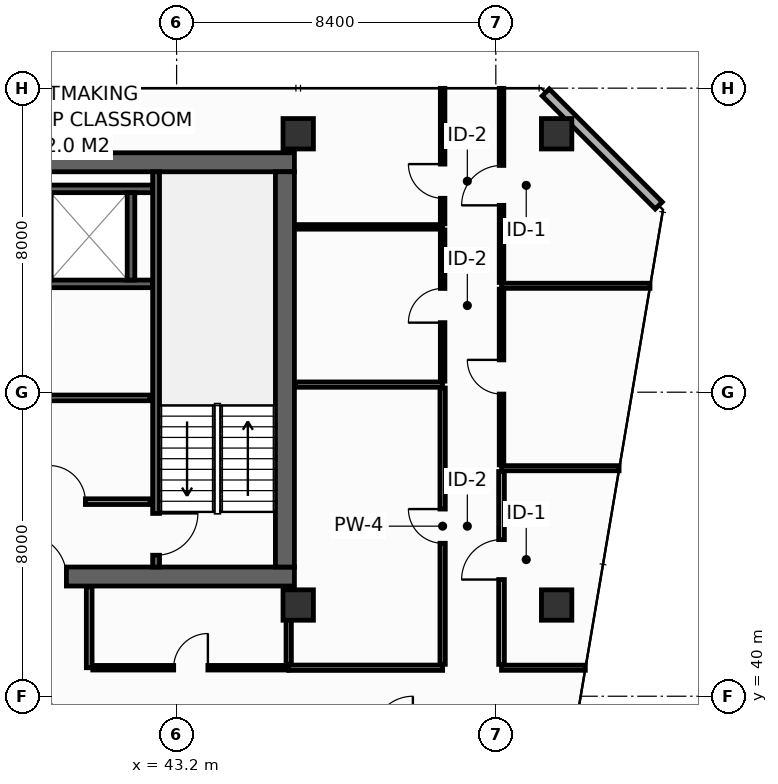
"""IFC4 building model, lengths in metres.
Left out: names, types, materials, properties, quantities, classifications, styles, units other than length and angle.
Written with IfcOpenShell. Run it as: python <this file> out.ifc"""

import sys

from ifc_helpers import new_model, si_unit, direction, frame, frame_2d, origin, origin_2d, place, context, subcontext, project, spatial, rectangle, hollow_rectangle, extrude, element, fill, save


model = new_model("IFC4")
c1 = context("Model", 3, precision=1e-05, world=origin(), true_north=direction((0.0, 1.0)))
c2 = subcontext(c1, "Body", "Model", "MODEL_VIEW")
j1 = project(units=[si_unit("LENGTHUNIT", "METRE"), si_unit("PLANEANGLEUNIT", "RADIAN")], contexts=[c1])
p1 = place(None, origin())
s1 = spatial("IfcSite", under=j1, at=p1, CompositionType="ELEMENT")
p2 = place(p1, origin())
s2 = spatial("IfcBuilding", under=s1, at=p2, CompositionType="ELEMENT")
p3 = place(p2, frame((0.0, 0.0, 217.0)))
s3 = spatial("IfcBuildingStorey", under=s2, at=p3, CompositionType="ELEMENT", Elevation=217.0)
p4 = place(p3, frame((13.6, 43.15, 0.0), z_axis=(0.0, 0.0, 1.0), x_axis=(1.0, 0.0, 0.0)))
e1 = element("IfcWall", 1, at=p4, inside=s3, PredefinedType="SHEAR", context=c2, shape_type="SweptSolid", body=[
    extrude(rectangle(XDim=32.7, YDim=0.5, at=frame_2d((16.35, 0.0))), origin(), (0.0, 0.0, 1.0), 3.55),
])
p5 = place(p4, frame((5.4, 0.0, 0.0)))
e2 = element("IfcOpeningElement", 2, at=p5, cuts=e1, PredefinedType="OPENING", context=c2, shape_type="SweptSolid", body=[
    extrude(rectangle(XDim=1.1, YDim=2.15, at=frame_2d((0.55, 1.075))), frame((0.0, 0.26, 0.0), z_axis=(0.0, -1.0, 0.0), x_axis=(1.0, 0.0, 0.0)), (0.0, 0.0, 1.0), 0.52),
])
p6 = place(p4, frame((25.6, 0.0, 0.0)))
e3 = element("IfcOpeningElement", 3, at=p6, cuts=e1, PredefinedType="OPENING", context=c2, shape_type="SweptSolid", body=[
    extrude(rectangle(XDim=1.1, YDim=2.15, at=frame_2d((0.55, 1.075))), frame((0.0, 0.26, 0.0), z_axis=(0.0, -1.0, 0.0), x_axis=(1.0, 0.0, 0.0)), (0.0, 0.0, 1.0), 0.52),
])
p7 = place(p3, frame((13.6, 54.05, 0.0), z_axis=(0.0, 0.0, 1.0), x_axis=(1.0, 0.0, 0.0)))
e4 = element("IfcWall", 4, at=p7, inside=s3, PredefinedType="SHEAR", context=c2, shape_type="SweptSolid", body=[
    extrude(rectangle(XDim=32.7, YDim=0.5, at=frame_2d((16.35, 0.0))), origin(), (0.0, 0.0, 1.0), 3.55),
])
p8 = place(p3, frame((46.05, 43.4, 0.0), z_axis=(0.0, 0.0, 1.0), x_axis=(0.0, 1.0, 0.0)))
e5 = element("IfcWall", 5, at=p8, inside=s3, PredefinedType="SHEAR", context=c2, shape_type="SweptSolid", body=[
    extrude(rectangle(XDim=10.4, YDim=0.5, at=frame_2d((5.2, 0.0))), origin(), (0.0, 0.0, 1.0), 3.55),
])
for number, where, z_axis, x_axis in (
    (6, (46.4, 54.8, 0.0), (0.0, 0.0, 1.0), (1.0, 0.0, 0.0)),
    (7, (53.2, 54.8, 0.0), (0.0, 0.0, 1.0), (1.0, 0.0, 0.0)),
    (8, (46.4, 42.4, 0.0), (0.0, 0.0, 1.0), (1.0, 0.0, 0.0)),
    (9, (53.2, 42.4, 0.0), (0.0, 0.0, 1.0), (1.0, 0.0, 0.0)),
):
    element("IfcColumn", number, at=place(p3, frame(where, z_axis=z_axis, x_axis=x_axis)), inside=s3, PredefinedType="COLUMN", context=c2, shape_type="SweptSolid", body=[
        extrude(hollow_rectangle(XDim=0.8, YDim=0.8, WallThickness=0.036, at=origin_2d()), origin(), (0.0, 0.0, 1.0), 3.8),
    ])
for number, where, z_axis, x_axis in (
    (10, (39.525, 50.85, 0.0), (0.0, 0.0, 1.0), (1.0, 0.0, 0.0)),
    (11, (39.525, 53.35, 0.0), (0.0, 0.0, 1.0), (1.0, 0.0, 0.0)),
):
    element("IfcWall", number, at=place(p3, frame(where, z_axis=z_axis, x_axis=x_axis)), inside=s3, PredefinedType="SHEAR", context=c2, shape_type="SweptSolid", body=[
        extrude(rectangle(XDim=3.045, YDim=0.2, at=frame_2d((1.522, 0.0))), origin(), (0.0, 0.0, 1.0), 3.55),
    ])
p9 = place(p3, frame((42.0, 50.95, 0.0), z_axis=(0.0, 0.0, 1.0), x_axis=(0.0, 1.0, 0.0)))
e12 = element("IfcWall", 12, at=p9, inside=s3, PredefinedType="SHEAR", context=c2, shape_type="SweptSolid", body=[
    extrude(rectangle(XDim=2.3, YDim=0.2, at=frame_2d((1.15, 0.0))), origin(), (0.0, 0.0, 1.0), 3.55),
])
p10 = place(p3, frame((42.66, 53.8, 0.0), z_axis=(0.0, 0.0, 1.0), x_axis=(0.0, -1.0, 0.0)))
e13 = element("IfcWall", 13, at=p10, inside=s3, PredefinedType="SHEAR", context=c2, shape_type="SweptSolid", body=[
    extrude(rectangle(XDim=10.4, YDim=0.18, at=frame_2d((5.2, 0.0))), origin(), (0.0, 0.0, 1.0), 3.55),
])
p11 = place(p10, frame((8.99, 0.0, 0.0)))
e14 = element("IfcOpeningElement", 14, at=p11, cuts=e13, PredefinedType="OPENING", context=c2, shape_type="SweptSolid", body=[
    extrude(rectangle(XDim=1.1, YDim=2.15, at=frame_2d((0.55, 1.075))), frame((0.0, 0.1, 0.0), z_axis=(0.0, -1.0, 0.0), x_axis=(1.0, 0.0, 0.0)), (0.0, 0.0, 1.0), 0.2),
])
p12 = place(p3, frame((34.05, 45.12, 0.0), z_axis=(0.0, 0.0, 1.0), x_axis=(1.0, 0.0, 0.0)))
e15 = element("IfcWall", 15, at=p12, inside=s3, PredefinedType="PARTITIONING", context=c2, shape_type="SweptSolid", body=[
    extrude(rectangle(XDim=8.45, YDim=0.15, at=frame_2d((4.225, 0.0))), origin(), (0.0, 0.0, 1.0), 3.55),
])
p13 = place(p12, frame((1.5, 0.0, 0.0)))
e16 = element("IfcOpeningElement", 16, at=p13, cuts=e15, PredefinedType="OPENING", context=c2, shape_type="SweptSolid", body=[
    extrude(rectangle(XDim=0.95, YDim=2.15, at=frame_2d((0.475, 1.075))), frame((0.0, 0.085, 0.0), z_axis=(0.0, -1.0, 0.0), x_axis=(1.0, 0.0, 0.0)), (0.0, 0.0, 1.0), 0.17),
])
p14 = place(p12, frame((5.8, 0.0, 0.0)))
e17 = element("IfcOpeningElement", 17, at=p14, cuts=e15, PredefinedType="OPENING", context=c2, shape_type="SweptSolid", body=[
    extrude(rectangle(XDim=0.95, YDim=2.15, at=frame_2d((0.475, 1.075))), frame((0.0, 0.085, 0.0), z_axis=(0.0, -1.0, 0.0), x_axis=(1.0, 0.0, 0.0)), (0.0, 0.0, 1.0), 0.17),
])
p15 = place(p3, frame((34.05, 47.85, 0.0), z_axis=(0.0, 0.0, 1.0), x_axis=(1.0, 0.0, 0.0)))
e18 = element("IfcWall", 18, at=p15, inside=s3, PredefinedType="PARTITIONING", context=c2, shape_type="SweptSolid", body=[
    extrude(rectangle(XDim=8.45, YDim=0.15, at=frame_2d((4.225, 0.0))), origin(), (0.0, 0.0, 1.0), 3.55),
])
p16 = place(p3, frame((55.887, 52.913, 0.0), z_axis=(0.0, 0.0, 1.0), x_axis=(-0.707106781187, 0.707106781187, 0.0)))
e19 = element("IfcWall", 19, at=p16, inside=s3, PredefinedType="STANDARD", context=c2, shape_type="SweptSolid", body=[
    extrude(rectangle(XDim=4.206, YDim=0.26, at=frame_2d((2.103, 0.0))), origin(), (0.0, 0.0, 1.0), 3.55),
])
p17 = place(p3, frame((46.15, 40.75, 0.0), z_axis=(0.0, 0.0, 1.0), x_axis=(1.0, 0.0, 0.0)))
e20 = element("IfcWall", 20, at=p17, inside=s3, PredefinedType="PARTITIONING", context=c2, shape_type="SweptSolid", body=[
    extrude(rectangle(XDim=4.05, YDim=0.14, at=frame_2d((2.025, 0.0))), origin(), (0.0, 0.0, 1.0), 3.55),
])
p18 = place(p3, frame((46.15, 40.84, 0.0), z_axis=(0.0, 0.0, 1.0), x_axis=(0.0, 1.0, 0.0)))
e21 = element("IfcWall", 21, at=p18, inside=s3, PredefinedType="PARTITIONING", context=c2, shape_type="SweptSolid", body=[
    extrude(rectangle(XDim=2.04, YDim=0.14, at=frame_2d((1.02, 0.0))), origin(), (0.0, 0.0, 1.0), 3.55),
])
p19 = place(p3, frame((46.32, 48.2, 0.0), z_axis=(0.0, 0.0, 1.0), x_axis=(1.0, 0.0, 0.0)))
e22 = element("IfcWall", 22, at=p19, inside=s3, PredefinedType="PARTITIONING", context=c2, shape_type="SweptSolid", body=[
    extrude(rectangle(XDim=3.88, YDim=0.14, at=frame_2d((1.94, 0.0))), origin(), (0.0, 0.0, 1.0), 3.55),
])
p20 = place(p3, frame((50.2, 40.84, 0.0), z_axis=(0.0, 0.0, 1.0), x_axis=(0.0, 1.0, 0.0)))
e23 = element("IfcWall", 23, at=p20, inside=s3, PredefinedType="PARTITIONING", context=c2, shape_type="SweptSolid", body=[
    extrude(rectangle(XDim=7.27, YDim=0.14, at=frame_2d((3.635, 0.0))), origin(), (0.0, 0.0, 1.0), 2.835),
])
p21 = place(p20, frame((3.185, 0.0, 0.0)))
e24 = element("IfcOpeningElement", 24, at=p21, cuts=e23, PredefinedType="OPENING", context=c2, shape_type="SweptSolid", body=[
    extrude(rectangle(XDim=0.9, YDim=2.1, at=frame_2d((0.45, 1.05))), frame((0.0, 0.08, 0.0), z_axis=(0.0, -1.0, 0.0), x_axis=(1.0, 0.0, 0.0)), (0.0, 0.0, 1.0), 0.16),
])
p22 = place(p3, frame((46.32, 52.35, 0.0), z_axis=(0.0, 0.0, 1.0), x_axis=(1.0, 0.0, 0.0)))
e25 = element("IfcWall", 25, at=p22, inside=s3, PredefinedType="PARTITIONING", context=c2, shape_type="SweptSolid", body=[
    extrude(rectangle(XDim=3.88, YDim=0.12, at=frame_2d((1.94, 0.0))), origin(), (0.0, 0.0, 1.0), 3.55),
])
p23 = place(p3, frame((50.2, 48.29, 0.0), z_axis=(0.0, 0.0, 1.0), x_axis=(0.0, 1.0, 0.0)))
e26 = element("IfcWall", 26, at=p23, inside=s3, PredefinedType="PARTITIONING", context=c2, shape_type="SweptSolid", body=[
    extrude(rectangle(XDim=3.98, YDim=0.12, at=frame_2d((1.99, 0.0))), origin(), (0.0, 0.0, 1.0), 3.55),
])
p24 = place(p23, frame((1.54, 0.0, 0.0)))
e27 = element("IfcOpeningElement", 27, at=p24, cuts=e26, PredefinedType="OPENING", context=c2, shape_type="SweptSolid", body=[
    extrude(rectangle(XDim=0.9, YDim=2.1, at=frame_2d((0.45, 1.05))), frame((0.0, 0.07, 0.0), z_axis=(0.0, -1.0, 0.0), x_axis=(1.0, 0.0, 0.0)), (0.0, 0.0, 1.0), 0.14),
])
p25 = place(p3, frame((50.2, 52.43, 0.0), z_axis=(0.0, 0.0, 1.0), x_axis=(0.0, 1.0, 0.0)))
e28 = element("IfcWall", 28, at=p25, inside=s3, PredefinedType="PARTITIONING", context=c2, shape_type="SweptSolid", body=[
    extrude(rectangle(XDim=3.565, YDim=0.12, at=frame_2d((1.783, 0.0))), origin(), (0.0, 0.0, 1.0), 2.935),
])
p26 = place(p25, frame((0.672, 0.0, 0.0)))
e29 = element("IfcOpeningElement", 29, at=p26, cuts=e28, PredefinedType="OPENING", context=c2, shape_type="SweptSolid", body=[
    extrude(rectangle(XDim=0.9, YDim=2.1, at=frame_2d((0.45, 1.05))), frame((0.0, 0.07, 0.0), z_axis=(0.0, -1.0, 0.0), x_axis=(1.0, 0.0, 0.0)), (0.0, 0.0, 1.0), 0.14),
])
p27 = place(p3, frame((51.75, 40.75, 0.0), z_axis=(0.0, 0.0, 1.0), x_axis=(1.0, 0.0, 0.0)))
e30 = element("IfcWall", 30, at=p27, inside=s3, PredefinedType="PARTITIONING", context=c2, shape_type="SweptSolid", body=[
    extrude(rectangle(XDim=2.205, YDim=0.135, at=frame_2d((1.103, 0.0))), origin(), (0.0, 0.0, 1.0), 3.035),
])
p28 = place(p3, frame((51.75, 46.0, 0.0), z_axis=(0.0, 0.0, 1.0), x_axis=(1.0, 0.0, 0.0)))
e31 = element("IfcWall", 31, at=p28, inside=s3, PredefinedType="PARTITIONING", context=c2, shape_type="SweptSolid", body=[
    extrude(rectangle(XDim=3.094, YDim=0.135, at=frame_2d((1.547, 0.0))), origin(), (0.0, 0.0, 1.0), 2.835),
])
p29 = place(p3, frame((51.75, 50.8, 0.0), z_axis=(0.0, 0.0, 1.0), x_axis=(1.0, 0.0, 0.0)))
e32 = element("IfcWall", 32, at=p29, inside=s3, PredefinedType="PARTITIONING", context=c2, shape_type="SweptSolid", body=[
    extrude(rectangle(XDim=3.906, YDim=0.135, at=frame_2d((1.953, 0.0))), origin(), (0.0, 0.0, 1.0), 2.835),
])
p30 = place(p3, frame((51.75, 40.837, 0.0), z_axis=(0.0, 0.0, 1.0), x_axis=(0.0, 1.0, 0.0)))
e33 = element("IfcWall", 33, at=p30, inside=s3, PredefinedType="PARTITIONING", context=c2, shape_type="SweptSolid", body=[
    extrude(rectangle(XDim=5.075, YDim=0.15, at=frame_2d((2.538, 0.0))), origin(), (0.0, 0.0, 1.0), 2.835),
])
p31 = place(p30, frame((2.233, 0.0, 0.0)))
e34 = element("IfcOpeningElement", 34, at=p31, cuts=e33, PredefinedType="OPENING", context=c2, shape_type="SweptSolid", body=[
    extrude(rectangle(XDim=1.05, YDim=2.15, at=frame_2d((0.525, 1.075))), frame((0.0, 0.085, 0.0), z_axis=(0.0, -1.0, 0.0), x_axis=(1.0, 0.0, 0.0)), (0.0, 0.0, 1.0), 0.17),
])
p32 = place(p3, frame((51.75, 46.087, 0.0), z_axis=(0.0, 0.0, 1.0), x_axis=(0.0, 1.0, 0.0)))
e35 = element("IfcWall", 35, at=p32, inside=s3, PredefinedType="PARTITIONING", context=c2, shape_type="SweptSolid", body=[
    extrude(rectangle(XDim=4.625, YDim=0.12, at=frame_2d((2.312, 0.0))), origin(), (0.0, 0.0, 1.0), 3.55),
])
p33 = place(p32, frame((1.863, 0.0, 0.0)))
e36 = element("IfcOpeningElement", 36, at=p33, cuts=e35, PredefinedType="OPENING", context=c2, shape_type="SweptSolid", body=[
    extrude(rectangle(XDim=0.9, YDim=2.1, at=frame_2d((0.45, 1.05))), frame((0.0, 0.07, 0.0), z_axis=(0.0, -1.0, 0.0), x_axis=(1.0, 0.0, 0.0)), (0.0, 0.0, 1.0), 0.14),
])
p34 = place(p3, frame((51.75, 50.887, 0.0), z_axis=(0.0, 0.0, 1.0), x_axis=(0.0, 1.0, 0.0)))
e37 = element("IfcWall", 37, at=p34, inside=s3, PredefinedType="PARTITIONING", context=c2, shape_type="SweptSolid", body=[
    extrude(rectangle(XDim=5.108, YDim=0.12, at=frame_2d((2.554, 0.0))), origin(), (0.0, 0.0, 1.0), 2.935),
])
p35 = place(p34, frame((2.029, 0.0, 0.0)))
e38 = element("IfcOpeningElement", 38, at=p35, cuts=e37, PredefinedType="OPENING", context=c2, shape_type="SweptSolid", body=[
    extrude(rectangle(XDim=1.05, YDim=2.15, at=frame_2d((0.525, 1.075))), frame((0.0, 0.07, 0.0), z_axis=(0.0, -1.0, 0.0), x_axis=(1.0, 0.0, 0.0)), (0.0, 0.0, 1.0), 0.14),
])
p36 = place(p3, frame((40.9, 40.75, 0.0), z_axis=(0.0, 0.0, 1.0), x_axis=(0.0, 1.0, 0.0)))
e39 = element("IfcWall", 39, at=p36, inside=s3, PredefinedType="PARTITIONING", context=c2, shape_type="SweptSolid", body=[
    extrude(rectangle(XDim=2.13, YDim=0.15, at=frame_2d((1.065, 0.0))), origin(), (0.0, 0.0, 1.0), 3.55),
])
p37 = place(p3, frame((40.995, 40.75, 0.0), z_axis=(0.0, 0.0, 1.0), x_axis=(1.0, 0.0, 0.0)))
e40 = element("IfcWall", 40, at=p37, inside=s3, PredefinedType="PARTITIONING", context=c2, shape_type="SweptSolid", body=[
    extrude(rectangle(XDim=5.155, YDim=0.12, at=frame_2d((2.577, 0.0))), origin(), (0.0, 0.0, 1.0), 3.55),
])
p38 = place(p37, frame((2.128, 0.0, 0.0)))
e41 = element("IfcOpeningElement", 41, at=p38, cuts=e40, PredefinedType="OPENING", context=c2, shape_type="SweptSolid", body=[
    extrude(rectangle(XDim=0.9, YDim=2.1, at=frame_2d((0.45, 1.05))), frame((0.0, 0.07, 0.0), z_axis=(0.0, -1.0, 0.0), x_axis=(1.0, 0.0, 0.0)), (0.0, 0.0, 1.0), 0.14),
])
p39 = place(p11, origin())
e42 = element("IfcDoor", 42, at=p39, inside=s3, OperationType="SINGLE_SWING_LEFT", PredefinedType="DOOR", context=c2, shape_type="SweptSolid", body=[
    extrude(rectangle(XDim=1.1, YDim=2.15, at=frame_2d((0.55, 1.075))), frame((0.0, 0.025, 0.0), z_axis=(0.0, -1.0, 0.0), x_axis=(1.0, 0.0, 0.0)), (0.0, 0.0, 1.0), 0.05),
])
fill(e14, e42)
p40 = place(p6, origin())
e43 = element("IfcDoor", 43, at=p40, inside=s3, OperationType="SINGLE_SWING_LEFT", PredefinedType="DOOR", context=c2, shape_type="SweptSolid", body=[
    extrude(rectangle(XDim=1.1, YDim=2.15, at=frame_2d((0.55, 1.075))), frame((0.0, 0.025, 0.0), z_axis=(0.0, -1.0, 0.0), x_axis=(1.0, 0.0, 0.0)), (0.0, 0.0, 1.0), 0.05),
])
fill(e3, e43)
p41 = place(p14, origin())
e44 = element("IfcDoor", 44, at=p41, inside=s3, OperationType="SINGLE_SWING_LEFT", PredefinedType="DOOR", context=c2, shape_type="SweptSolid", body=[
    extrude(rectangle(XDim=0.95, YDim=2.15, at=frame_2d((0.475, 1.075))), frame((0.0, 0.025, 0.0), z_axis=(0.0, -1.0, 0.0), x_axis=(1.0, 0.0, 0.0)), (0.0, 0.0, 1.0), 0.05),
])
fill(e17, e44)
p42 = place(p21, origin())
e45 = element("IfcDoor", 45, at=p42, inside=s3, OperationType="SINGLE_SWING_RIGHT", PredefinedType="DOOR", context=c2, shape_type="SweptSolid", body=[
    extrude(rectangle(XDim=0.9, YDim=2.1, at=frame_2d((0.45, 1.05))), frame((0.0, 0.025, 0.0), z_axis=(0.0, -1.0, 0.0), x_axis=(1.0, 0.0, 0.0)), (0.0, 0.0, 1.0), 0.05),
])
fill(e24, e45)
p43 = place(p24, origin())
e46 = element("IfcDoor", 46, at=p43, inside=s3, OperationType="SINGLE_SWING_LEFT", PredefinedType="DOOR", context=c2, shape_type="SweptSolid", body=[
    extrude(rectangle(XDim=0.9, YDim=2.1, at=frame_2d((0.45, 1.05))), frame((0.0, 0.025, 0.0), z_axis=(0.0, -1.0, 0.0), x_axis=(1.0, 0.0, 0.0)), (0.0, 0.0, 1.0), 0.05),
])
fill(e27, e46)
p44 = place(p26, origin())
e47 = element("IfcDoor", 47, at=p44, inside=s3, OperationType="SINGLE_SWING_RIGHT", PredefinedType="DOOR", context=c2, shape_type="SweptSolid", body=[
    extrude(rectangle(XDim=0.9, YDim=2.1, at=frame_2d((0.45, 1.05))), frame((0.0, 0.025, 0.0), z_axis=(0.0, -1.0, 0.0), x_axis=(1.0, 0.0, 0.0)), (0.0, 0.0, 1.0), 0.05),
])
fill(e29, e47)
p45 = place(p31, origin())
e48 = element("IfcDoor", 48, at=p45, inside=s3, OperationType="SINGLE_SWING_LEFT", PredefinedType="DOOR", context=c2, shape_type="SweptSolid", body=[
    extrude(rectangle(XDim=1.05, YDim=2.15, at=frame_2d((0.525, 1.075))), frame((0.0, 0.025, 0.0), z_axis=(0.0, -1.0, 0.0), x_axis=(1.0, 0.0, 0.0)), (0.0, 0.0, 1.0), 0.05),
])
fill(e34, e48)
p46 = place(p33, origin())
e49 = element("IfcDoor", 49, at=p46, inside=s3, OperationType="SINGLE_SWING_RIGHT", PredefinedType="DOOR", context=c2, shape_type="SweptSolid", body=[
    extrude(rectangle(XDim=0.9, YDim=2.1, at=frame_2d((0.45, 1.05))), frame((0.0, 0.025, 0.0), z_axis=(0.0, -1.0, 0.0), x_axis=(1.0, 0.0, 0.0)), (0.0, 0.0, 1.0), 0.05),
])
fill(e36, e49)
p47 = place(p35, origin())
e50 = element("IfcDoor", 50, at=p47, inside=s3, OperationType="SINGLE_SWING_LEFT", PredefinedType="DOOR", context=c2, shape_type="SweptSolid", body=[
    extrude(rectangle(XDim=1.05, YDim=2.15, at=frame_2d((0.525, 1.075))), frame((0.0, 0.025, 0.0), z_axis=(0.0, -1.0, 0.0), x_axis=(1.0, 0.0, 0.0)), (0.0, 0.0, 1.0), 0.05),
])
fill(e38, e50)
p48 = place(p38, origin())
e51 = element("IfcDoor", 51, at=p48, inside=s3, OperationType="SINGLE_SWING_RIGHT", PredefinedType="DOOR", context=c2, shape_type="SweptSolid", body=[
    extrude(rectangle(XDim=0.9, YDim=2.1, at=frame_2d((0.45, 1.05))), frame((0.0, 0.025, 0.0), z_axis=(0.0, -1.0, 0.0), x_axis=(1.0, 0.0, 0.0)), (0.0, 0.0, 1.0), 0.05),
])
fill(e41, e51)
save(model, sys.argv[1])
